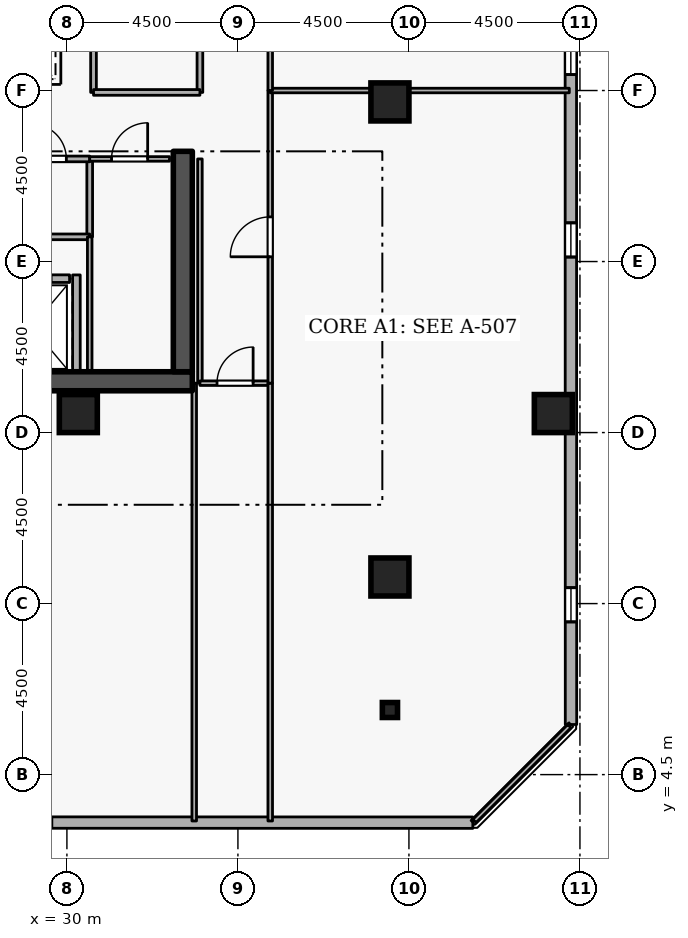
"""IFC4 building model, lengths in metres.
Left out: names, types, materials, properties, quantities, classifications, styles, units other than length and angle.
Written with IfcOpenShell. Run it as: python <this file> out.ifc"""

import sys

from ifc_helpers import new_model, si_unit, direction, frame, frame_2d, origin, origin_2d, place, context, subcontext, project, spatial, rectangle, i_section, extrude, element, fill, save


model = new_model("IFC4")
c1 = context("Model", 3, precision=1e-05, world=origin(), true_north=direction((0.0, 1.0)))
c2 = subcontext(c1, "Body", "Model", "MODEL_VIEW")
j1 = project(units=[si_unit("LENGTHUNIT", "METRE"), si_unit("PLANEANGLEUNIT", "RADIAN")], contexts=[c1])
p1 = place(None, origin())
s1 = spatial("IfcSite", under=j1, at=p1, CompositionType="ELEMENT")
p2 = place(p1, origin())
s2 = spatial("IfcBuilding", under=s1, at=p2, CompositionType="ELEMENT")
p3 = place(p2, frame((0.0, 0.0, 243.9)))
s3 = spatial("IfcBuildingStorey", under=s2, at=p3, CompositionType="ELEMENT", Elevation=243.9)
p4 = place(p3, frame((17.7, 14.85, 0.0), z_axis=(0.0, 0.0, 1.0), x_axis=(1.0, 0.0, 0.0)))
e1 = element("IfcWall", 1, at=p4, inside=s3, PredefinedType="SHEAR", context=c2, shape_type="SweptSolid", body=[
    extrude(rectangle(XDim=15.6, YDim=0.5, at=frame_2d((7.8, 0.0))), origin(), (0.0, 0.0, 1.0), 3.6),
])
p5 = place(p3, frame((33.05, 15.1, 0.0), z_axis=(0.0, 0.0, 1.0), x_axis=(0.0, 1.0, 0.0)))
e2 = element("IfcWall", 2, at=p5, inside=s3, PredefinedType="SHEAR", context=c2, shape_type="SweptSolid", body=[
    extrude(rectangle(XDim=5.8, YDim=0.5, at=frame_2d((2.9, 0.0))), origin(), (0.0, 0.0, 1.0), 3.6),
])
for number, where, z_axis, x_axis in (
    (3, (38.5, 9.7, 0.0), (0.0, 0.0, 1.0), (1.0, 0.0, 0.0)),
    (4, (42.8, 14.0, 0.0), (0.0, 0.0, 1.0), (1.0, 0.0, 0.0)),
    (5, (38.5, 22.2, 0.0), (0.0, 0.0, 1.0), (1.0, 0.0, 0.0)),
    (6, (30.3, 14.0, 0.0), (0.0, 0.0, 1.0), (1.0, 0.0, 0.0)),
):
    element("IfcColumn", number, at=place(p3, frame(where, z_axis=z_axis, x_axis=x_axis)), inside=s3, PredefinedType="COLUMN", context=c2, shape_type="SweptSolid", body=[
        extrude(rectangle(XDim=1.0, YDim=1.0, at=origin_2d()), origin(), (0.0, 0.0, 1.0), 3.6),
    ])
p6 = place(p3, frame((38.5, 6.2, 0.0), z_axis=(0.0, 0.0, 1.0), x_axis=(1.0, 0.0, 0.0)))
e7 = element("IfcColumn", 7, at=p6, inside=s3, PredefinedType="COLUMN", context=c2, shape_type="SweptSolid", body=[
    extrude(i_section(OverallWidth=0.399, OverallDepth=0.394, WebThickness=0.023, FlangeThickness=0.037, FilletRadius=0.015, at=origin_2d()), origin(), (0.0, 0.0, 1.0), 3.6),
])
p7 = place(p3, frame((6.801, 3.244, 0.0), z_axis=(0.0, 0.0, 1.0), x_axis=(0.999999969988, -0.000244999128, 0.0)))
e8 = element("IfcWall", 8, at=p7, inside=s3, PredefinedType="STANDARD", context=c2, shape_type="SweptSolid", body=[
    extrude(rectangle(XDim=33.881, YDim=0.3, at=frame_2d((16.94, 0.0))), origin(), (0.0, 0.0, 1.0), 2.7),
])
p8 = place(p7, frame((2.7, 0.0, 0.72)))
e9 = element("IfcOpeningElement", 9, at=p8, cuts=e8, PredefinedType="OPENING", context=c2, shape_type="SweptSolid", body=[
    extrude(rectangle(XDim=0.9, YDim=1.75, at=frame_2d((0.45, 0.875))), frame((0.0, 0.16, 0.0), z_axis=(0.0, -1.0, 0.0), x_axis=(1.0, 0.0, 0.0)), (0.0, 0.0, 1.0), 0.32),
])
p9 = place(p7, frame((12.3, 0.0, 0.72)))
e10 = element("IfcOpeningElement", 10, at=p9, cuts=e8, PredefinedType="OPENING", context=c2, shape_type="SweptSolid", body=[
    extrude(rectangle(XDim=0.9, YDim=1.75, at=frame_2d((0.45, 0.875))), frame((0.0, 0.16, 0.0), z_axis=(0.0, -1.0, 0.0), x_axis=(1.0, 0.0, 0.0)), (0.0, 0.0, 1.0), 0.32),
])
p10 = place(p7, frame((17.1, 0.0, 0.72)))
e11 = element("IfcOpeningElement", 11, at=p10, cuts=e8, PredefinedType="OPENING", context=c2, shape_type="SweptSolid", body=[
    extrude(rectangle(XDim=0.9, YDim=1.75, at=frame_2d((0.45, 0.875))), frame((0.0, 0.16, 0.0), z_axis=(0.0, -1.0, 0.0), x_axis=(1.0, 0.0, 0.0)), (0.0, 0.0, 1.0), 0.32),
])
p11 = place(p7, frame((21.9, 0.0, 0.72)))
e12 = element("IfcOpeningElement", 12, at=p11, cuts=e8, PredefinedType="OPENING", context=c2, shape_type="SweptSolid", body=[
    extrude(rectangle(XDim=0.9, YDim=1.75, at=frame_2d((0.45, 0.875))), frame((0.0, 0.16, 0.0), z_axis=(0.0, -1.0, 0.0), x_axis=(1.0, 0.0, 0.0)), (0.0, 0.0, 1.0), 0.32),
])
p12 = place(p3, frame((43.265, 5.819, 0.0), z_axis=(0.0, 0.0, 1.0), x_axis=(-0.000244999128, 0.999999969988, 0.0)))
e13 = element("IfcWall", 13, at=p12, inside=s3, PredefinedType="STANDARD", context=c2, shape_type="SweptSolid", body=[
    extrude(rectangle(XDim=33.881, YDim=0.3, at=frame_2d((16.94, 0.0))), origin(), (0.0, 0.0, 1.0), 2.7),
])
p13 = place(p12, frame((2.7, 0.0, 0.72)))
e14 = element("IfcOpeningElement", 14, at=p13, cuts=e13, PredefinedType="OPENING", context=c2, shape_type="SweptSolid", body=[
    extrude(rectangle(XDim=0.9, YDim=1.75, at=frame_2d((0.45, 0.875))), frame((0.0, 0.16, 0.0), z_axis=(0.0, -1.0, 0.0), x_axis=(1.0, 0.0, 0.0)), (0.0, 0.0, 1.0), 0.32),
])
p14 = place(p12, frame((12.3, 0.0, 0.72)))
e15 = element("IfcOpeningElement", 15, at=p14, cuts=e13, PredefinedType="OPENING", context=c2, shape_type="SweptSolid", body=[
    extrude(rectangle(XDim=0.9, YDim=1.75, at=frame_2d((0.45, 0.875))), frame((0.0, 0.16, 0.0), z_axis=(0.0, -1.0, 0.0), x_axis=(1.0, 0.0, 0.0)), (0.0, 0.0, 1.0), 0.32),
])
p15 = place(p12, frame((17.1, 0.0, 0.72)))
e16 = element("IfcOpeningElement", 16, at=p15, cuts=e13, PredefinedType="OPENING", context=c2, shape_type="SweptSolid", body=[
    extrude(rectangle(XDim=0.9, YDim=1.75, at=frame_2d((0.45, 0.875))), frame((0.0, 0.16, 0.0), z_axis=(0.0, -1.0, 0.0), x_axis=(1.0, 0.0, 0.0)), (0.0, 0.0, 1.0), 0.32),
])
p16 = place(p12, frame((26.7, 0.0, 0.72)))
e17 = element("IfcOpeningElement", 17, at=p16, cuts=e13, PredefinedType="OPENING", context=c2, shape_type="SweptSolid", body=[
    extrude(rectangle(XDim=0.9, YDim=1.75, at=frame_2d((0.45, 0.875))), frame((0.0, 0.16, 0.0), z_axis=(0.0, -1.0, 0.0), x_axis=(1.0, 0.0, 0.0)), (0.0, 0.0, 1.0), 0.32),
])
p17 = place(p3, frame((28.08, 17.55, 0.0), z_axis=(0.0, 0.0, 1.0), x_axis=(1.0, 0.0, 0.0)))
e18 = element("IfcWall", 18, at=p17, inside=s3, PredefinedType="STANDARD", context=c2, shape_type="SweptSolid", body=[
    extrude(rectangle(XDim=1.99, YDim=0.2, at=frame_2d((0.995, 0.0))), origin(), (0.0, 0.0, 1.0), 3.34),
])
p18 = place(p17, frame((0.485, 0.0, 0.0)))
e19 = element("IfcOpeningElement", 19, at=p18, cuts=e18, PredefinedType="OPENING", context=c2, shape_type="SweptSolid", body=[
    extrude(rectangle(XDim=1.02, YDim=2.06, at=frame_2d((0.51, 1.03))), frame((0.0, 0.11, 0.0), z_axis=(0.0, -1.0, 0.0), x_axis=(1.0, 0.0, 0.0)), (0.0, 0.0, 1.0), 0.22),
])
p19 = place(p3, frame((30.25, 15.112, 0.0), z_axis=(0.0, 0.0, 1.0), x_axis=(0.0, 1.0, 0.0)))
e20 = element("IfcWall", 20, at=p19, inside=s3, PredefinedType="STANDARD", context=c2, shape_type="SweptSolid", body=[
    extrude(rectangle(XDim=2.536, YDim=0.2, at=frame_2d((1.268, 0.0))), origin(), (0.0, 0.0, 1.0), 3.34),
])
p20 = place(p3, frame((30.6, 20.7, 0.0), z_axis=(0.0, 0.0, 1.0), x_axis=(0.0, -1.0, 0.0)))
e21 = element("IfcWall", 21, at=p20, inside=s3, PredefinedType="PARTITIONING", context=c2, shape_type="SweptSolid", body=[
    extrude(rectangle(XDim=2.05, YDim=0.15, at=frame_2d((1.025, 0.0))), origin(), (0.0, 0.0, 1.0), 3.34),
])
p21 = place(p3, frame((30.6, 18.65, 0.0), z_axis=(0.0, 0.0, 1.0), x_axis=(-1.0, 0.0, 0.0)))
e22 = element("IfcWall", 22, at=p21, inside=s3, PredefinedType="PARTITIONING", context=c2, shape_type="SweptSolid", body=[
    extrude(rectangle(XDim=2.15, YDim=0.15, at=frame_2d((1.075, 0.0))), origin(), (0.0, 0.0, 1.0), 3.34),
])
p22 = place(p3, frame((28.45, 20.7, 0.0), z_axis=(0.0, 0.0, 1.0), x_axis=(1.0, 0.0, 0.0)))
e23 = element("IfcWall", 23, at=p22, inside=s3, PredefinedType="PARTITIONING", context=c2, shape_type="SweptSolid", body=[
    extrude(rectangle(XDim=2.15, YDim=0.15, at=frame_2d((1.075, 0.0))), origin(), (0.0, 0.0, 1.0), 3.34),
])
p23 = place(p22, frame((0.615, 0.0, 0.0)))
e24 = element("IfcOpeningElement", 24, at=p23, cuts=e23, PredefinedType="OPENING", context=c2, shape_type="SweptSolid", body=[
    extrude(rectangle(XDim=0.92, YDim=2.08, at=frame_2d((0.46, 1.04))), frame((0.0, 0.085, 0.0), z_axis=(0.0, -1.0, 0.0), x_axis=(1.0, 0.0, 0.0)), (0.0, 0.0, 1.0), 0.17),
])
p24 = place(p3, frame((30.6, 15.1, 0.0), z_axis=(0.0, 0.0, 1.0), x_axis=(0.0, 1.0, 0.0)))
e25 = element("IfcWall", 25, at=p24, inside=s3, PredefinedType="PARTITIONING", context=c2, shape_type="SweptSolid", body=[
    extrude(rectangle(XDim=3.55, YDim=0.12, at=frame_2d((1.775, 0.0))), origin(), (0.0, 0.0, 1.0), 3.34),
])
p25 = place(p3, frame((30.6, 20.7, 0.0), z_axis=(0.0, 0.0, 1.0), x_axis=(1.0, 0.0, 0.0)))
e26 = element("IfcWall", 26, at=p25, inside=s3, PredefinedType="PARTITIONING", context=c2, shape_type="SweptSolid", body=[
    extrude(rectangle(XDim=2.1, YDim=0.12, at=frame_2d((1.05, 0.0))), origin(), (0.0, 0.0, 1.0), 3.34),
])
p26 = place(p25, frame((0.575, 0.0, 0.0)))
e27 = element("IfcOpeningElement", 27, at=p26, cuts=e26, PredefinedType="OPENING", context=c2, shape_type="SweptSolid", body=[
    extrude(rectangle(XDim=0.95, YDim=2.1, at=frame_2d((0.475, 1.05))), frame((0.0, 0.07, 0.0), z_axis=(0.0, -1.0, 0.0), x_axis=(1.0, 0.0, 0.0)), (0.0, 0.0, 1.0), 0.14),
])
p27 = place(p3, frame((33.5, 20.7, 0.0), z_axis=(0.0, 0.0, 1.0), x_axis=(0.0, -1.0, 0.0)))
e28 = element("IfcWall", 28, at=p27, inside=s3, PredefinedType="PARTITIONING", context=c2, shape_type="SweptSolid", body=[
    extrude(rectangle(XDim=5.9, YDim=0.12, at=frame_2d((2.95, 0.0))), origin(), (0.0, 0.0, 1.0), 3.34),
])
p28 = place(p3, frame((33.5, 14.8, 0.0), z_axis=(0.0, 0.0, 1.0), x_axis=(1.0, 0.0, 0.0)))
e29 = element("IfcWall", 29, at=p28, inside=s3, PredefinedType="PARTITIONING", context=c2, shape_type="SweptSolid", body=[
    extrude(rectangle(XDim=1.85, YDim=0.12, at=frame_2d((0.925, 0.0))), origin(), (0.0, 0.0, 1.0), 3.34),
])
p29 = place(p28, frame((0.45, 0.0, 0.0)))
e30 = element("IfcOpeningElement", 30, at=p29, cuts=e29, PredefinedType="OPENING", context=c2, shape_type="SweptSolid", body=[
    extrude(rectangle(XDim=0.95, YDim=2.1, at=frame_2d((0.475, 1.05))), frame((0.0, 0.07, 0.0), z_axis=(0.0, -1.0, 0.0), x_axis=(1.0, 0.0, 0.0)), (0.0, 0.0, 1.0), 0.14),
])
for number, where, z_axis, x_axis in (
    (31, (35.35, 14.8, 0.0), (0.0, 0.0, 1.0), (0.0, -1.0, 0.0)),
    (32, (33.35, 3.28, 0.0), (0.0, 0.0, 1.0), (0.0, 1.0, 0.0)),
):
    element("IfcWall", number, at=place(p3, frame(where, z_axis=z_axis, x_axis=x_axis)), inside=s3, PredefinedType="PARTITIONING", context=c2, shape_type="SweptSolid", body=[
        extrude(rectangle(XDim=11.52, YDim=0.12, at=frame_2d((5.76, 0.0))), origin(), (0.0, 0.0, 1.0), 3.34),
    ])
p30 = place(p3, frame((35.35, 14.8, 0.0), z_axis=(0.0, 0.0, 1.0), x_axis=(0.0, 1.0, 0.0)))
e33 = element("IfcWall", 33, at=p30, inside=s3, PredefinedType="PARTITIONING", context=c2, shape_type="SweptSolid", body=[
    extrude(rectangle(XDim=7.7, YDim=0.12, at=frame_2d((3.85, 0.0))), origin(), (0.0, 0.0, 1.0), 3.34),
])
p31 = place(p30, frame((3.325, 0.0, 0.0)))
e34 = element("IfcOpeningElement", 34, at=p31, cuts=e33, PredefinedType="OPENING", context=c2, shape_type="SweptSolid", body=[
    extrude(rectangle(XDim=1.05, YDim=2.1, at=frame_2d((0.525, 1.05))), frame((0.0, 0.07, 0.0), z_axis=(0.0, -1.0, 0.0), x_axis=(1.0, 0.0, 0.0)), (0.0, 0.0, 1.0), 0.14),
])
p32 = place(p3, frame((35.35, 22.5, 0.0), z_axis=(0.0, 0.0, 1.0), x_axis=(1.0, 0.0, 0.0)))
e35 = element("IfcWall", 35, at=p32, inside=s3, PredefinedType="PARTITIONING", context=c2, shape_type="SweptSolid", body=[
    extrude(rectangle(XDim=7.87, YDim=0.12, at=frame_2d((3.935, 0.0))), origin(), (0.0, 0.0, 1.0), 3.34),
])
p33 = place(p3, frame((43.22, 5.775, 0.0), z_axis=(0.0, 0.0, 1.0), x_axis=(-0.707106781187, -0.707106781187, 0.0)))
e36 = element("IfcWall", 36, at=p33, inside=s3, PredefinedType="PARTITIONING", context=c2, shape_type="SweptSolid", body=[
    extrude(rectangle(XDim=3.528, YDim=0.12, at=frame_2d((1.764, 0.0))), origin(), (0.0, 0.0, 1.0), 3.34),
])
p34 = place(p3, frame((35.35, 22.5, 0.0), z_axis=(0.0, 0.0, 1.0), x_axis=(0.0, 1.0, 0.0)))
e37 = element("IfcWall", 37, at=p34, inside=s3, PredefinedType="PARTITIONING", context=c2, shape_type="SweptSolid", body=[
    extrude(rectangle(XDim=6.3, YDim=0.12, at=frame_2d((3.15, 0.0))), origin(), (0.0, 0.0, 1.0), 3.34),
])
p35 = place(p34, frame((2.675, 0.0, 0.0)))
e38 = element("IfcOpeningElement", 38, at=p35, cuts=e37, PredefinedType="OPENING", context=c2, shape_type="SweptSolid", body=[
    extrude(rectangle(XDim=0.95, YDim=2.1, at=frame_2d((0.475, 1.05))), frame((0.0, 0.07, 0.0), z_axis=(0.0, -1.0, 0.0), x_axis=(1.0, 0.0, 0.0)), (0.0, 0.0, 1.0), 0.14),
])
p36 = place(p3, frame((30.7, 22.45, 0.0), z_axis=(0.0, 0.0, 1.0), x_axis=(0.0, 1.0, 0.0)))
e39 = element("IfcWall", 39, at=p36, inside=s3, PredefinedType="PARTITIONING", context=c2, shape_type="SweptSolid", body=[
    extrude(rectangle(XDim=4.55, YDim=0.15, at=frame_2d((2.275, 0.0))), origin(), (0.0, 0.0, 1.0), 3.34),
])
p37 = place(p3, frame((33.5, 27.0, 0.0), z_axis=(0.0, 0.0, 1.0), x_axis=(0.0, -1.0, 0.0)))
e40 = element("IfcWall", 40, at=p37, inside=s3, PredefinedType="PARTITIONING", context=c2, shape_type="SweptSolid", body=[
    extrude(rectangle(XDim=4.55, YDim=0.15, at=frame_2d((2.275, 0.0))), origin(), (0.0, 0.0, 1.0), 3.34),
])
p38 = place(p37, frame((1.625, 0.0, 0.0)))
e41 = element("IfcOpeningElement", 41, at=p38, cuts=e40, PredefinedType="OPENING", context=c2, shape_type="SweptSolid", body=[
    extrude(rectangle(XDim=1.3, YDim=2.12, at=frame_2d((0.65, 1.06))), frame((0.0, 0.085, 0.0), z_axis=(0.0, -1.0, 0.0), x_axis=(1.0, 0.0, 0.0)), (0.0, 0.0, 1.0), 0.17),
])
p39 = place(p3, frame((33.5, 22.45, 0.0), z_axis=(0.0, 0.0, 1.0), x_axis=(-1.0, 0.0, 0.0)))
e42 = element("IfcWall", 42, at=p39, inside=s3, PredefinedType="PARTITIONING", context=c2, shape_type="SweptSolid", body=[
    extrude(rectangle(XDim=2.8, YDim=0.15, at=frame_2d((1.4, 0.0))), origin(), (0.0, 0.0, 1.0), 3.34),
])
p40 = place(p11, origin())
e43 = element("IfcWindow", 43, at=p40, inside=s3, PartitioningType="SINGLE_PANEL", PredefinedType="WINDOW", context=c2, shape_type="SweptSolid", body=[
    extrude(rectangle(XDim=0.9, YDim=1.75, at=frame_2d((0.45, 0.875))), frame((0.0, 0.03, 0.0), z_axis=(0.0, -1.0, 0.0), x_axis=(1.0, 0.0, 0.0)), (0.0, 0.0, 1.0), 0.06),
])
fill(e12, e43)
p41 = place(p13, origin())
e44 = element("IfcWindow", 44, at=p41, inside=s3, PartitioningType="SINGLE_PANEL", PredefinedType="WINDOW", context=c2, shape_type="SweptSolid", body=[
    extrude(rectangle(XDim=0.9, YDim=1.75, at=frame_2d((0.45, 0.875))), frame((0.0, 0.03, 0.0), z_axis=(0.0, -1.0, 0.0), x_axis=(1.0, 0.0, 0.0)), (0.0, 0.0, 1.0), 0.06),
])
fill(e14, e44)
p42 = place(p14, origin())
e45 = element("IfcWindow", 45, at=p42, inside=s3, PartitioningType="SINGLE_PANEL", PredefinedType="WINDOW", context=c2, shape_type="SweptSolid", body=[
    extrude(rectangle(XDim=0.9, YDim=1.75, at=frame_2d((0.45, 0.875))), frame((0.0, 0.03, 0.0), z_axis=(0.0, -1.0, 0.0), x_axis=(1.0, 0.0, 0.0)), (0.0, 0.0, 1.0), 0.06),
])
fill(e15, e45)
p43 = place(p15, origin())
e46 = element("IfcWindow", 46, at=p43, inside=s3, PartitioningType="SINGLE_PANEL", PredefinedType="WINDOW", context=c2, shape_type="SweptSolid", body=[
    extrude(rectangle(XDim=0.9, YDim=1.75, at=frame_2d((0.45, 0.875))), frame((0.0, 0.03, 0.0), z_axis=(0.0, -1.0, 0.0), x_axis=(1.0, 0.0, 0.0)), (0.0, 0.0, 1.0), 0.06),
])
fill(e16, e46)
p44 = place(p23, origin())
e47 = element("IfcDoor", 47, at=p44, inside=s3, OperationType="SINGLE_SWING_LEFT", PredefinedType="DOOR", context=c2, shape_type="SweptSolid", body=[
    extrude(rectangle(XDim=0.92, YDim=2.08, at=frame_2d((0.46, 1.04))), frame((0.0, 0.025, 0.0), z_axis=(0.0, -1.0, 0.0), x_axis=(1.0, 0.0, 0.0)), (0.0, 0.0, 1.0), 0.05),
])
fill(e24, e47)
p45 = place(p26, origin())
e48 = element("IfcDoor", 48, at=p45, inside=s3, OperationType="SINGLE_SWING_RIGHT", PredefinedType="DOOR", context=c2, shape_type="SweptSolid", body=[
    extrude(rectangle(XDim=0.95, YDim=2.1, at=frame_2d((0.475, 1.05))), frame((0.0, 0.025, 0.0), z_axis=(0.0, -1.0, 0.0), x_axis=(1.0, 0.0, 0.0)), (0.0, 0.0, 1.0), 0.05),
])
fill(e27, e48)
p46 = place(p29, origin())
e49 = element("IfcDoor", 49, at=p46, inside=s3, OperationType="SINGLE_SWING_RIGHT", PredefinedType="DOOR", context=c2, shape_type="SweptSolid", body=[
    extrude(rectangle(XDim=0.95, YDim=2.1, at=frame_2d((0.475, 1.05))), frame((0.0, 0.025, 0.0), z_axis=(0.0, -1.0, 0.0), x_axis=(1.0, 0.0, 0.0)), (0.0, 0.0, 1.0), 0.05),
])
fill(e30, e49)
p47 = place(p31, origin())
e50 = element("IfcDoor", 50, at=p47, inside=s3, OperationType="SINGLE_SWING_LEFT", PredefinedType="DOOR", context=c2, shape_type="SweptSolid", body=[
    extrude(rectangle(XDim=1.05, YDim=2.1, at=frame_2d((0.525, 1.05))), frame((0.0, 0.025, 0.0), z_axis=(0.0, -1.0, 0.0), x_axis=(1.0, 0.0, 0.0)), (0.0, 0.0, 1.0), 0.05),
])
fill(e34, e50)
save(model, sys.argv[1])
